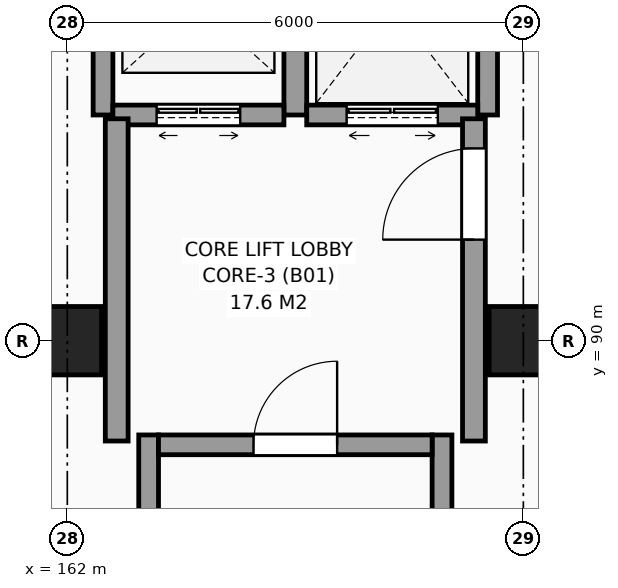
"""IFC4 building model, lengths in metres.
Left out: names, types, materials, properties, quantities, classifications, styles, units other than length and angle.
Written with IfcOpenShell. Run it as: python <this file> out.ifc"""

import sys

from ifc_helpers import new_model, si_unit, direction, frame, frame_2d, origin, origin_2d, place, context, subcontext, project, spatial, rectangle, extrude, element, fill, save


model = new_model("IFC4")
c1 = context("Model", 3, precision=1e-05, world=origin(), true_north=direction((0.0, 1.0)))
c2 = subcontext(c1, "Body", "Model", "MODEL_VIEW")
j1 = project(units=[si_unit("LENGTHUNIT", "METRE"), si_unit("PLANEANGLEUNIT", "RADIAN")], contexts=[c1])
p1 = place(None, origin())
s1 = spatial("IfcSite", under=j1, at=p1, CompositionType="ELEMENT")
p2 = place(p1, origin())
s2 = spatial("IfcBuilding", under=s1, at=p2, CompositionType="ELEMENT")
p3 = place(p2, frame((0.0, 0.0, -4.8)))
s3 = spatial("IfcBuildingStorey", under=s2, at=p3, CompositionType="ELEMENT", Elevation=-4.8)
for number, where, z_axis, x_axis in (
    (1, (162.0, 90.0, 0.0), (0.0, 0.0, 1.0), (1.0, 0.0, 0.0)),
    (2, (168.0, 90.0, 0.0), (0.0, 0.0, 1.0), (1.0, 0.0, 0.0)),
):
    element("IfcColumn", number, at=place(p3, frame(where, z_axis=z_axis, x_axis=x_axis)), inside=s3, PredefinedType="COLUMN", context=c2, shape_type="SweptSolid", body=[
        extrude(rectangle(XDim=0.9, YDim=0.9, at=origin_2d()), origin(), (0.0, 0.0, 1.0), 4.8),
    ])
for number, where, z_axis, x_axis in (
    (3, (163.07, 78.04, -0.5), (0.0, 0.0, 1.0), (0.0, 1.0, 0.0)),
    (4, (166.93, 78.04, -0.5), (0.0, 0.0, 1.0), (0.0, 1.0, 0.0)),
):
    element("IfcWall", number, at=place(p3, frame(where, z_axis=z_axis, x_axis=x_axis)), inside=s3, PredefinedType="SHEAR", context=c2, shape_type="SweptSolid", body=[
        extrude(rectangle(XDim=10.72, YDim=0.26, at=frame_2d((5.36, 0.0))), origin(), (0.0, 0.0, 1.0), 5.3),
    ])
p4 = place(p3, frame((163.2, 88.63, -0.5), z_axis=(0.0, 0.0, 1.0), x_axis=(1.0, 0.0, 0.0)))
e5 = element("IfcWall", 5, at=p4, inside=s3, PredefinedType="SHEAR", context=c2, shape_type="SweptSolid", body=[
    extrude(rectangle(XDim=3.6, YDim=0.26, at=frame_2d((1.8, 0.0))), origin(), (0.0, 0.0, 1.0), 5.3),
])
p5 = place(p4, frame((1.25, 0.0, 0.5)))
e6 = element("IfcOpeningElement", 6, at=p5, cuts=e5, PredefinedType="OPENING", context=c2, shape_type="SweptSolid", body=[
    extrude(rectangle(XDim=1.1, YDim=2.15, at=frame_2d((0.55, 1.075))), frame((0.0, 0.14, 0.0), z_axis=(0.0, -1.0, 0.0), x_axis=(1.0, 0.0, 0.0)), (0.0, 0.0, 1.0), 0.28),
])
p6 = place(p3, frame((162.47, 92.97, -0.5), z_axis=(0.0, 0.0, 1.0), x_axis=(0.0, 1.0, 0.0)))
e7 = element("IfcWall", 7, at=p6, inside=s3, PredefinedType="SHEAR", context=c2, shape_type="SweptSolid", body=[
    extrude(rectangle(XDim=2.91, YDim=0.26, at=frame_2d((1.455, 0.0))), origin(), (0.0, 0.0, 1.0), 5.3),
])
p7 = place(p3, frame((165.0, 92.97, -0.5), z_axis=(0.0, 0.0, 1.0), x_axis=(0.0, 1.0, 0.0)))
e8 = element("IfcWall", 8, at=p7, inside=s3, PredefinedType="SHEAR", context=c2, shape_type="SweptSolid", body=[
    extrude(rectangle(XDim=2.91, YDim=0.3, at=frame_2d((1.455, 0.0))), origin(), (0.0, 0.0, 1.0), 5.3),
])
p8 = place(p3, frame((162.6, 92.97, -0.5), z_axis=(0.0, 0.0, 1.0), x_axis=(1.0, 0.0, 0.0)))
e9 = element("IfcWall", 9, at=p8, inside=s3, PredefinedType="SHEAR", context=c2, shape_type="SweptSolid", body=[
    extrude(rectangle(XDim=2.25, YDim=0.26, at=frame_2d((1.125, 0.0))), origin(), (0.0, 0.0, 1.0), 5.3),
])
p9 = place(p8, frame((0.575, 0.0, 0.5)))
e10 = element("IfcOpeningElement", 10, at=p9, cuts=e9, PredefinedType="OPENING", context=c2, shape_type="SweptSolid", body=[
    extrude(rectangle(XDim=1.1, YDim=2.2, at=frame_2d((0.55, 1.1))), frame((0.0, 0.14, 0.0), z_axis=(0.0, -1.0, 0.0), x_axis=(1.0, 0.0, 0.0)), (0.0, 0.0, 1.0), 0.28),
])
p10 = place(p3, frame((167.53, 92.97, -0.5), z_axis=(0.0, 0.0, 1.0), x_axis=(0.0, 1.0, 0.0)))
e11 = element("IfcWall", 11, at=p10, inside=s3, PredefinedType="SHEAR", context=c2, shape_type="SweptSolid", body=[
    extrude(rectangle(XDim=2.91, YDim=0.26, at=frame_2d((1.455, 0.0))), origin(), (0.0, 0.0, 1.0), 5.3),
])
p11 = place(p3, frame((165.15, 92.97, -0.5), z_axis=(0.0, 0.0, 1.0), x_axis=(1.0, 0.0, 0.0)))
e12 = element("IfcWall", 12, at=p11, inside=s3, PredefinedType="SHEAR", context=c2, shape_type="SweptSolid", body=[
    extrude(rectangle(XDim=2.25, YDim=0.26, at=frame_2d((1.125, 0.0))), origin(), (0.0, 0.0, 1.0), 5.3),
])
p12 = place(p11, frame((0.525, 0.0, 0.5)))
e13 = element("IfcOpeningElement", 13, at=p12, cuts=e12, PredefinedType="OPENING", context=c2, shape_type="SweptSolid", body=[
    extrude(rectangle(XDim=1.2, YDim=2.25, at=frame_2d((0.6, 1.125))), frame((0.0, 0.14, 0.0), z_axis=(0.0, -1.0, 0.0), x_axis=(1.0, 0.0, 0.0)), (0.0, 0.0, 1.0), 0.28),
])
p13 = place(p3, frame((167.35, 88.68, -0.5), z_axis=(0.0, 0.0, 1.0), x_axis=(0.0, 1.0, 0.0)))
e14 = element("IfcWall", 14, at=p13, inside=s3, PredefinedType="SHEAR", context=c2, shape_type="SweptSolid", body=[
    extrude(rectangle(XDim=4.24, YDim=0.3, at=frame_2d((2.12, 0.0))), origin(), (0.0, 0.0, 1.0), 5.3),
])
p14 = place(p13, frame((2.65, 0.0, 0.5)))
e15 = element("IfcOpeningElement", 15, at=p14, cuts=e14, PredefinedType="OPENING", context=c2, shape_type="SweptSolid", body=[
    extrude(rectangle(XDim=1.2, YDim=2.2, at=frame_2d((0.6, 1.1))), frame((0.0, 0.16, 0.0), z_axis=(0.0, -1.0, 0.0), x_axis=(1.0, 0.0, 0.0)), (0.0, 0.0, 1.0), 0.32),
])
p15 = place(p3, frame((162.65, 88.68, -0.5), z_axis=(0.0, 0.0, 1.0), x_axis=(0.0, 1.0, 0.0)))
e16 = element("IfcWall", 16, at=p15, inside=s3, PredefinedType="SHEAR", context=c2, shape_type="SweptSolid", body=[
    extrude(rectangle(XDim=4.24, YDim=0.3, at=frame_2d((2.12, 0.0))), origin(), (0.0, 0.0, 1.0), 5.3),
])
p16 = place(p5, origin())
e17 = element("IfcDoor", 17, at=p16, inside=s3, OperationType="SINGLE_SWING_RIGHT", PredefinedType="DOOR", context=c2, shape_type="SweptSolid", body=[
    extrude(rectangle(XDim=1.1, YDim=2.15, at=frame_2d((0.55, 1.075))), frame((0.0, 0.025, 0.0), z_axis=(0.0, -1.0, 0.0), x_axis=(1.0, 0.0, 0.0)), (0.0, 0.0, 1.0), 0.05),
])
fill(e6, e17)
p17 = place(p9, origin())
e18 = element("IfcDoor", 18, at=p17, inside=s3, OperationType="DOUBLE_DOOR_SLIDING", PredefinedType="DOOR", context=c2, shape_type="SweptSolid", body=[
    extrude(rectangle(XDim=1.1, YDim=2.2, at=frame_2d((0.55, 1.1))), frame((0.0, 0.025, 0.0), z_axis=(0.0, -1.0, 0.0), x_axis=(1.0, 0.0, 0.0)), (0.0, 0.0, 1.0), 0.05),
])
fill(e10, e18)
p18 = place(p12, origin())
e19 = element("IfcDoor", 19, at=p18, inside=s3, OperationType="DOUBLE_DOOR_SLIDING", PredefinedType="DOOR", context=c2, shape_type="SweptSolid", body=[
    extrude(rectangle(XDim=1.2, YDim=2.25, at=frame_2d((0.6, 1.125))), frame((0.0, 0.025, 0.0), z_axis=(0.0, -1.0, 0.0), x_axis=(1.0, 0.0, 0.0)), (0.0, 0.0, 1.0), 0.05),
])
fill(e13, e19)
p19 = place(p14, origin())
e20 = element("IfcDoor", 20, at=p19, inside=s3, OperationType="SINGLE_SWING_LEFT", PredefinedType="DOOR", context=c2, shape_type="SweptSolid", body=[
    extrude(rectangle(XDim=1.2, YDim=2.2, at=frame_2d((0.6, 1.1))), frame((0.0, 0.025, 0.0), z_axis=(0.0, -1.0, 0.0), x_axis=(1.0, 0.0, 0.0)), (0.0, 0.0, 1.0), 0.05),
])
fill(e15, e20)
save(model, sys.argv[1])
